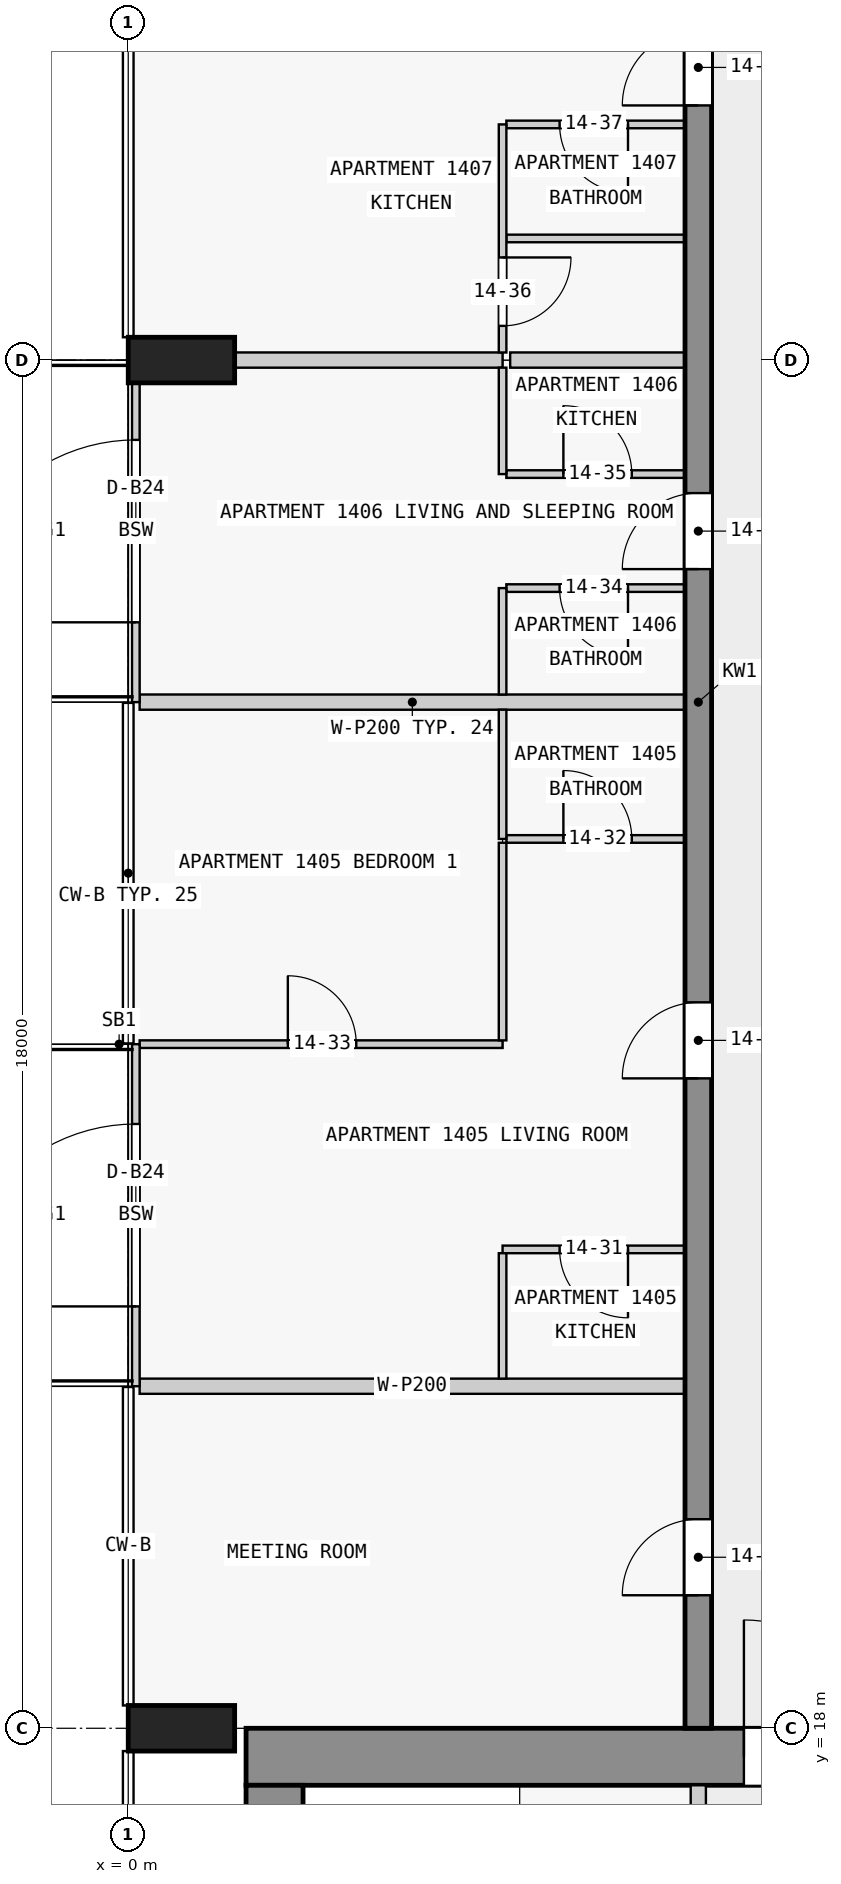
"""IFC4 building model, lengths in metres.
Left out: names, types, materials, properties, quantities, classifications, styles, units other than length and angle.
Written with IfcOpenShell. Run it as: python <this file> out.ifc"""

import sys

from ifc_helpers import new_model, si_unit, direction, frame, frame_2d, origin, origin_2d, place, context, subcontext, project, spatial, rectangle, extrude, element, fill, save


model = new_model("IFC4")
c1 = context("Model", 3, precision=1e-05, world=origin(), true_north=direction((0.0, 1.0)))
c2 = subcontext(c1, "Body", "Model", "MODEL_VIEW")
j1 = project(units=[si_unit("LENGTHUNIT", "METRE"), si_unit("PLANEANGLEUNIT", "RADIAN")], contexts=[c1])
p1 = place(None, origin())
s1 = spatial("IfcSite", under=j1, at=p1, CompositionType="ELEMENT")
p2 = place(p1, origin())
s2 = spatial("IfcBuilding", under=s1, at=p2, CompositionType="ELEMENT")
p3 = place(p2, frame((0.0, 0.0, 58.3)))
s3 = spatial("IfcBuildingStorey", under=s2, at=p3, CompositionType="ELEMENT", Elevation=58.3)
for number, where, z_axis, x_axis in (
    (1, (0.7, 36.0, 0.0), (0.0, 0.0, 1.0), (0.0, 1.0, 0.0)),
    (2, (0.7, 18.0, 0.0), (0.0, 0.0, 1.0), (0.0, 1.0, 0.0)),
):
    element("IfcColumn", number, at=place(p3, frame(where, z_axis=z_axis, x_axis=x_axis)), inside=s3, PredefinedType="COLUMN", context=c2, shape_type="SweptSolid", body=[
        extrude(rectangle(XDim=0.6, YDim=1.4, at=origin_2d()), origin(), (0.0, 0.0, 1.0), 3.5),
    ])
p4 = place(p3, frame((1.55, 17.625, 0.0), z_axis=(0.0, 0.0, 1.0), x_axis=(1.0, 0.0, 0.0)))
e3 = element("IfcWall", 3, at=p4, inside=s3, PredefinedType="SHEAR", context=c2, shape_type="SweptSolid", body=[
    extrude(rectangle(XDim=20.95, YDim=0.75, at=frame_2d((10.475, 0.0))), origin(), (0.0, 0.0, 1.0), 3.25),
])
p5 = place(p4, frame((6.55, 0.0, 0.0)))
e4 = element("IfcOpeningElement", 4, at=p5, cuts=e3, PredefinedType="OPENING", context=c2, shape_type="SweptSolid", body=[
    extrude(rectangle(XDim=1.8, YDim=2.1, at=frame_2d((0.9, 1.05))), frame((0.0, 0.385, 0.0), z_axis=(0.0, -1.0, 0.0), x_axis=(1.0, 0.0, 0.0)), (0.0, 0.0, 1.0), 0.77),
])
p6 = place(p3, frame((1.925, 2.5, 0.0), z_axis=(0.0, 0.0, 1.0), x_axis=(0.0, 1.0, 0.0)))
e5 = element("IfcWall", 5, at=p6, inside=s3, PredefinedType="SHEAR", context=c2, shape_type="SweptSolid", body=[
    extrude(rectangle(XDim=14.75, YDim=0.75, at=frame_2d((7.375, 0.0))), origin(), (0.0, 0.0, 1.0), 3.25),
])
p7 = place(p3, frame((7.5, 18.0, 0.0), z_axis=(0.0, 0.0, 1.0), x_axis=(0.0, 1.0, 0.0)))
e6 = element("IfcWall", 6, at=p7, inside=s3, PredefinedType="SHEAR", context=c2, shape_type="SweptSolid", body=[
    extrude(rectangle(XDim=27.0, YDim=0.35, at=frame_2d((13.5, 0.0))), origin(), (0.0, 0.0, 1.0), 3.25),
])
p8 = place(p7, frame((1.75, 0.0, 0.0)))
e7 = element("IfcOpeningElement", 7, at=p8, cuts=e6, PredefinedType="OPENING", context=c2, shape_type="SweptSolid", body=[
    extrude(rectangle(XDim=1.0, YDim=2.1, at=frame_2d((0.5, 1.05))), frame((0.0, 0.185, 0.0), z_axis=(0.0, -1.0, 0.0), x_axis=(1.0, 0.0, 0.0)), (0.0, 0.0, 1.0), 0.37),
])
p9 = place(p7, frame((8.55, 0.0, 0.0)))
e8 = element("IfcOpeningElement", 8, at=p9, cuts=e6, PredefinedType="OPENING", context=c2, shape_type="SweptSolid", body=[
    extrude(rectangle(XDim=1.0, YDim=2.1, at=frame_2d((0.5, 1.05))), frame((0.0, 0.185, 0.0), z_axis=(0.0, -1.0, 0.0), x_axis=(1.0, 0.0, 0.0)), (0.0, 0.0, 1.0), 0.37),
])
p10 = place(p7, frame((15.25, 0.0, 0.0)))
e9 = element("IfcOpeningElement", 9, at=p10, cuts=e6, PredefinedType="OPENING", context=c2, shape_type="SweptSolid", body=[
    extrude(rectangle(XDim=1.0, YDim=2.1, at=frame_2d((0.5, 1.05))), frame((0.0, 0.185, 0.0), z_axis=(0.0, -1.0, 0.0), x_axis=(1.0, 0.0, 0.0)), (0.0, 0.0, 1.0), 0.37),
])
p11 = place(p7, frame((21.35, 0.0, 0.0)))
e10 = element("IfcOpeningElement", 10, at=p11, cuts=e6, PredefinedType="OPENING", context=c2, shape_type="SweptSolid", body=[
    extrude(rectangle(XDim=1.0, YDim=2.1, at=frame_2d((0.5, 1.05))), frame((0.0, 0.185, 0.0), z_axis=(0.0, -1.0, 0.0), x_axis=(1.0, 0.0, 0.0)), (0.0, 0.0, 1.0), 0.37),
])
p12 = place(p3, frame((0.1, 22.5, 0.0), z_axis=(0.0, 0.0, 1.0), x_axis=(0.0, 1.0, 0.0)))
e11 = element("IfcWall", 11, at=p12, inside=s3, PredefinedType="STANDARD", context=c2, shape_type="SweptSolid", body=[
    extrude(rectangle(XDim=4.5, YDim=0.1, at=frame_2d((2.25, 0.0))), origin(), (0.0, 0.0, 1.0), 3.25),
])
p13 = place(p12, frame((1.05, 0.0, 0.0)))
e12 = element("IfcOpeningElement", 12, at=p13, cuts=e11, PredefinedType="OPENING", context=c2, shape_type="SweptSolid", body=[
    extrude(rectangle(XDim=2.4, YDim=2.4, at=frame_2d((1.2, 1.2))), frame((0.0, 0.06, 0.0), z_axis=(0.0, -1.0, 0.0), x_axis=(1.0, 0.0, 0.0)), (0.0, 0.0, 1.0), 0.12),
])
p14 = place(p3, frame((0.1, 31.5, 0.0), z_axis=(0.0, 0.0, 1.0), x_axis=(0.0, 1.0, 0.0)))
e13 = element("IfcWall", 13, at=p14, inside=s3, PredefinedType="STANDARD", context=c2, shape_type="SweptSolid", body=[
    extrude(rectangle(XDim=4.5, YDim=0.1, at=frame_2d((2.25, 0.0))), origin(), (0.0, 0.0, 1.0), 3.25),
])
p15 = place(p14, frame((1.05, 0.0, 0.0)))
e14 = element("IfcOpeningElement", 14, at=p15, cuts=e13, PredefinedType="OPENING", context=c2, shape_type="SweptSolid", body=[
    extrude(rectangle(XDim=2.4, YDim=2.4, at=frame_2d((1.2, 1.2))), frame((0.0, 0.06, 0.0), z_axis=(0.0, -1.0, 0.0), x_axis=(1.0, 0.0, 0.0)), (0.0, 0.0, 1.0), 0.12),
])
p16 = place(p3, frame((7.5, 10.1, 0.0), z_axis=(0.0, 0.0, 1.0), x_axis=(0.0, 1.0, 0.0)))
e15 = element("IfcWall", 15, at=p16, inside=s3, PredefinedType="PARTITIONING", context=c2, shape_type="SweptSolid", body=[
    extrude(rectangle(XDim=7.15, YDim=0.2, at=frame_2d((3.575, 0.0))), origin(), (0.0, 0.0, 1.0), 3.25),
])
p17 = place(p16, frame((0.8, 0.0, 0.0)))
e16 = element("IfcOpeningElement", 16, at=p17, cuts=e15, PredefinedType="OPENING", context=c2, shape_type="SweptSolid", body=[
    extrude(rectangle(XDim=0.9, YDim=2.1, at=frame_2d((0.45, 1.05))), frame((0.0, 0.11, 0.0), z_axis=(0.0, -1.0, 0.0), x_axis=(1.0, 0.0, 0.0)), (0.0, 0.0, 1.0), 0.22),
])
p18 = place(p16, frame((3.3, 0.0, 0.0)))
e17 = element("IfcOpeningElement", 17, at=p18, cuts=e15, PredefinedType="OPENING", context=c2, shape_type="SweptSolid", body=[
    extrude(rectangle(XDim=0.9, YDim=2.1, at=frame_2d((0.45, 1.05))), frame((0.0, 0.11, 0.0), z_axis=(0.0, -1.0, 0.0), x_axis=(1.0, 0.0, 0.0)), (0.0, 0.0, 1.0), 0.22),
])
p19 = place(p16, frame((5.25, 0.0, 0.0)))
e18 = element("IfcOpeningElement", 18, at=p19, cuts=e15, PredefinedType="OPENING", context=c2, shape_type="SweptSolid", body=[
    extrude(rectangle(XDim=0.9, YDim=2.1, at=frame_2d((0.45, 1.05))), frame((0.0, 0.11, 0.0), z_axis=(0.0, -1.0, 0.0), x_axis=(1.0, 0.0, 0.0)), (0.0, 0.0, 1.0), 0.22),
])
p20 = place(p3, frame((7.325, 22.5, 0.0), z_axis=(0.0, 0.0, 1.0), x_axis=(-1.0, 0.0, 0.0)))
e19 = element("IfcWall", 19, at=p20, inside=s3, PredefinedType="PARTITIONING", context=c2, shape_type="SweptSolid", body=[
    extrude(rectangle(XDim=7.175, YDim=0.2, at=frame_2d((3.587, 0.0))), origin(), (0.0, 0.0, 1.0), 3.25),
])
p21 = place(p3, frame((7.325, 24.3, 0.0), z_axis=(0.0, 0.0, 1.0), x_axis=(-1.0, 0.0, 0.0)))
e20 = element("IfcWall", 20, at=p21, inside=s3, PredefinedType="PARTITIONING", context=c2, shape_type="SweptSolid", body=[
    extrude(rectangle(XDim=2.4, YDim=0.1, at=frame_2d((1.2, 0.0))), origin(), (0.0, 0.0, 1.0), 3.25),
])
p22 = place(p21, frame((0.75, 0.0, 0.0)))
e21 = element("IfcOpeningElement", 21, at=p22, cuts=e20, PredefinedType="OPENING", context=c2, shape_type="SweptSolid", body=[
    extrude(rectangle(XDim=0.9, YDim=2.1, at=frame_2d((0.45, 1.05))), frame((0.0, 0.06, 0.0), z_axis=(0.0, -1.0, 0.0), x_axis=(1.0, 0.0, 0.0)), (0.0, 0.0, 1.0), 0.12),
])
p23 = place(p3, frame((0.15, 27.0, 0.0), z_axis=(0.0, 0.0, 1.0), x_axis=(1.0, 0.0, 0.0)))
e22 = element("IfcWall", 22, at=p23, inside=s3, PredefinedType="PARTITIONING", context=c2, shape_type="SweptSolid", body=[
    extrude(rectangle(XDim=4.775, YDim=0.1, at=frame_2d((2.388, 0.0))), origin(), (0.0, 0.0, 1.0), 3.25),
])
p24 = place(p23, frame((1.95, 0.0, 0.0)))
e23 = element("IfcOpeningElement", 23, at=p24, cuts=e22, PredefinedType="OPENING", context=c2, shape_type="SweptSolid", body=[
    extrude(rectangle(XDim=0.9, YDim=2.1, at=frame_2d((0.45, 1.05))), frame((0.0, 0.06, 0.0), z_axis=(0.0, -1.0, 0.0), x_axis=(1.0, 0.0, 0.0)), (0.0, 0.0, 1.0), 0.12),
])
p25 = place(p3, frame((4.975, 29.7, 0.0), z_axis=(0.0, 0.0, 1.0), x_axis=(1.0, 0.0, 0.0)))
e24 = element("IfcWall", 24, at=p25, inside=s3, PredefinedType="PARTITIONING", context=c2, shape_type="SweptSolid", body=[
    extrude(rectangle(XDim=2.35, YDim=0.1, at=frame_2d((1.175, 0.0))), origin(), (0.0, 0.0, 1.0), 3.25),
])
p26 = place(p25, frame((0.75, 0.0, 0.0)))
e25 = element("IfcOpeningElement", 25, at=p26, cuts=e24, PredefinedType="OPENING", context=c2, shape_type="SweptSolid", body=[
    extrude(rectangle(XDim=0.9, YDim=2.1, at=frame_2d((0.45, 1.05))), frame((0.0, 0.06, 0.0), z_axis=(0.0, -1.0, 0.0), x_axis=(1.0, 0.0, 0.0)), (0.0, 0.0, 1.0), 0.12),
])
p27 = place(p3, frame((7.325, 31.5, 0.0), z_axis=(0.0, 0.0, 1.0), x_axis=(-1.0, 0.0, 0.0)))
e26 = element("IfcWall", 26, at=p27, inside=s3, PredefinedType="PARTITIONING", context=c2, shape_type="SweptSolid", body=[
    extrude(rectangle(XDim=7.175, YDim=0.2, at=frame_2d((3.587, 0.0))), origin(), (0.0, 0.0, 1.0), 3.25),
])
p28 = place(p3, frame((7.325, 33.0, 0.0), z_axis=(0.0, 0.0, 1.0), x_axis=(-1.0, 0.0, 0.0)))
e27 = element("IfcWall", 27, at=p28, inside=s3, PredefinedType="PARTITIONING", context=c2, shape_type="SweptSolid", body=[
    extrude(rectangle(XDim=2.35, YDim=0.1, at=frame_2d((1.175, 0.0))), origin(), (0.0, 0.0, 1.0), 3.25),
])
p29 = place(p28, frame((0.75, 0.0, 0.0)))
e28 = element("IfcOpeningElement", 28, at=p29, cuts=e27, PredefinedType="OPENING", context=c2, shape_type="SweptSolid", body=[
    extrude(rectangle(XDim=0.9, YDim=2.1, at=frame_2d((0.45, 1.05))), frame((0.0, 0.06, 0.0), z_axis=(0.0, -1.0, 0.0), x_axis=(1.0, 0.0, 0.0)), (0.0, 0.0, 1.0), 0.12),
])
p30 = place(p3, frame((4.975, 34.5, 0.0), z_axis=(0.0, 0.0, 1.0), x_axis=(1.0, 0.0, 0.0)))
e29 = element("IfcWall", 29, at=p30, inside=s3, PredefinedType="PARTITIONING", context=c2, shape_type="SweptSolid", body=[
    extrude(rectangle(XDim=2.35, YDim=0.1, at=frame_2d((1.175, 0.0))), origin(), (0.0, 0.0, 1.0), 3.25),
])
p31 = place(p30, frame((0.75, 0.0, 0.0)))
e30 = element("IfcOpeningElement", 30, at=p31, cuts=e29, PredefinedType="OPENING", context=c2, shape_type="SweptSolid", body=[
    extrude(rectangle(XDim=0.9, YDim=2.1, at=frame_2d((0.45, 1.05))), frame((0.0, 0.06, 0.0), z_axis=(0.0, -1.0, 0.0), x_axis=(1.0, 0.0, 0.0)), (0.0, 0.0, 1.0), 0.12),
])
p32 = place(p3, frame((7.325, 36.0, 0.0), z_axis=(0.0, 0.0, 1.0), x_axis=(-1.0, 0.0, 0.0)))
e31 = element("IfcWall", 31, at=p32, inside=s3, PredefinedType="PARTITIONING", context=c2, shape_type="SweptSolid", body=[
    extrude(rectangle(XDim=2.3, YDim=0.2, at=frame_2d((1.15, 0.0))), origin(), (0.0, 0.0, 1.0), 3.25),
])
p33 = place(p3, frame((1.4, 36.0, 0.0), z_axis=(0.0, 0.0, 1.0), x_axis=(1.0, 0.0, 0.0)))
e32 = element("IfcWall", 32, at=p33, inside=s3, PredefinedType="PARTITIONING", context=c2, shape_type="SweptSolid", body=[
    extrude(rectangle(XDim=3.525, YDim=0.2, at=frame_2d((1.763, 0.0))), origin(), (0.0, 0.0, 1.0), 3.25),
])
p34 = place(p3, frame((7.325, 37.6, 0.0), z_axis=(0.0, 0.0, 1.0), x_axis=(-1.0, 0.0, 0.0)))
e33 = element("IfcWall", 33, at=p34, inside=s3, PredefinedType="PARTITIONING", context=c2, shape_type="SweptSolid", body=[
    extrude(rectangle(XDim=2.35, YDim=0.1, at=frame_2d((1.175, 0.0))), origin(), (0.0, 0.0, 1.0), 3.25),
])
p35 = place(p3, frame((7.325, 39.1, 0.0), z_axis=(0.0, 0.0, 1.0), x_axis=(-1.0, 0.0, 0.0)))
e34 = element("IfcWall", 34, at=p35, inside=s3, PredefinedType="PARTITIONING", context=c2, shape_type="SweptSolid", body=[
    extrude(rectangle(XDim=2.35, YDim=0.1, at=frame_2d((1.175, 0.0))), origin(), (0.0, 0.0, 1.0), 3.25),
])
p36 = place(p35, frame((0.75, 0.0, 0.0)))
e35 = element("IfcOpeningElement", 35, at=p36, cuts=e34, PredefinedType="OPENING", context=c2, shape_type="SweptSolid", body=[
    extrude(rectangle(XDim=0.9, YDim=2.1, at=frame_2d((0.45, 1.05))), frame((0.0, 0.06, 0.0), z_axis=(0.0, -1.0, 0.0), x_axis=(1.0, 0.0, 0.0)), (0.0, 0.0, 1.0), 0.12),
])
p37 = place(p3, frame((4.925, 24.25, 0.0), z_axis=(0.0, 0.0, 1.0), x_axis=(0.0, -1.0, 0.0)))
e36 = element("IfcWall", 36, at=p37, inside=s3, PredefinedType="PARTITIONING", context=c2, shape_type="SweptSolid", body=[
    extrude(rectangle(XDim=1.65, YDim=0.1, at=frame_2d((0.825, 0.0))), origin(), (0.0, 0.0, 1.0), 3.25),
])
p38 = place(p3, frame((4.925, 31.4, 0.0), z_axis=(0.0, 0.0, 1.0), x_axis=(0.0, -1.0, 0.0)))
e37 = element("IfcWall", 37, at=p38, inside=s3, PredefinedType="PARTITIONING", context=c2, shape_type="SweptSolid", body=[
    extrude(rectangle(XDim=1.7, YDim=0.1, at=frame_2d((0.85, 0.0))), origin(), (0.0, 0.0, 1.0), 3.25),
])
for number, where, z_axis, x_axis in (
    (38, (4.925, 33.0, 0.0), (0.0, 0.0, 1.0), (0.0, -1.0, 0.0)),
    (39, (4.925, 35.9, 0.0), (0.0, 0.0, 1.0), (0.0, -1.0, 0.0)),
):
    element("IfcWall", number, at=place(p3, frame(where, z_axis=z_axis, x_axis=x_axis)), inside=s3, PredefinedType="PARTITIONING", context=c2, shape_type="SweptSolid", body=[
        extrude(rectangle(XDim=1.4, YDim=0.1, at=frame_2d((0.7, 0.0))), origin(), (0.0, 0.0, 1.0), 3.25),
    ])
p39 = place(p3, frame((4.925, 39.1, 0.0), z_axis=(0.0, 0.0, 1.0), x_axis=(0.0, -1.0, 0.0)))
e40 = element("IfcWall", 40, at=p39, inside=s3, PredefinedType="PARTITIONING", context=c2, shape_type="SweptSolid", body=[
    extrude(rectangle(XDim=3.0, YDim=0.1, at=frame_2d((1.5, 0.0))), origin(), (0.0, 0.0, 1.0), 3.25),
])
p40 = place(p39, frame((1.75, 0.0, 0.0)))
e41 = element("IfcOpeningElement", 41, at=p40, cuts=e40, PredefinedType="OPENING", context=c2, shape_type="SweptSolid", body=[
    extrude(rectangle(XDim=0.9, YDim=2.1, at=frame_2d((0.45, 1.05))), frame((0.0, 0.06, 0.0), z_axis=(0.0, -1.0, 0.0), x_axis=(1.0, 0.0, 0.0)), (0.0, 0.0, 1.0), 0.12),
])
p41 = place(p3, frame((4.925, 27.05, 0.0), z_axis=(0.0, 0.0, 1.0), x_axis=(0.0, 1.0, 0.0)))
e42 = element("IfcWall", 42, at=p41, inside=s3, PredefinedType="PARTITIONING", context=c2, shape_type="SweptSolid", body=[
    extrude(rectangle(XDim=2.6, YDim=0.1, at=frame_2d((1.3, 0.0))), origin(), (0.0, 0.0, 1.0), 3.25),
])
p42 = place(p13, origin())
e43 = element("IfcDoor", 43, at=p42, inside=s3, OperationType="SINGLE_SWING_LEFT", PredefinedType="DOOR", context=c2, shape_type="SweptSolid", body=[
    extrude(rectangle(XDim=2.4, YDim=2.4, at=frame_2d((1.2, 1.2))), frame((0.0, 0.025, 0.0), z_axis=(0.0, -1.0, 0.0), x_axis=(1.0, 0.0, 0.0)), (0.0, 0.0, 1.0), 0.05),
])
fill(e12, e43)
p43 = place(p15, origin())
e44 = element("IfcDoor", 44, at=p43, inside=s3, OperationType="SINGLE_SWING_LEFT", PredefinedType="DOOR", context=c2, shape_type="SweptSolid", body=[
    extrude(rectangle(XDim=2.4, YDim=2.4, at=frame_2d((1.2, 1.2))), frame((0.0, 0.025, 0.0), z_axis=(0.0, -1.0, 0.0), x_axis=(1.0, 0.0, 0.0)), (0.0, 0.0, 1.0), 0.05),
])
fill(e14, e44)
p44 = place(p5, origin())
e45 = element("IfcDoor", 45, at=p44, inside=s3, OperationType="DOUBLE_DOOR_SINGLE_SWING", PredefinedType="DOOR", context=c2, shape_type="SweptSolid", body=[
    extrude(rectangle(XDim=1.8, YDim=2.1, at=frame_2d((0.9, 1.05))), frame((0.0, 0.025, 0.0), z_axis=(0.0, -1.0, 0.0), x_axis=(1.0, 0.0, 0.0)), (0.0, 0.0, 1.0), 0.05),
])
fill(e4, e45)
p45 = place(p8, origin())
e46 = element("IfcDoor", 46, at=p45, inside=s3, OperationType="SINGLE_SWING_LEFT", PredefinedType="DOOR", context=c2, shape_type="SweptSolid", body=[
    extrude(rectangle(XDim=1.0, YDim=2.1, at=frame_2d((0.5, 1.05))), frame((0.0, 0.025, 0.0), z_axis=(0.0, -1.0, 0.0), x_axis=(1.0, 0.0, 0.0)), (0.0, 0.0, 1.0), 0.05),
])
fill(e7, e46)
p46 = place(p9, origin())
e47 = element("IfcDoor", 47, at=p46, inside=s3, OperationType="SINGLE_SWING_LEFT", PredefinedType="DOOR", context=c2, shape_type="SweptSolid", body=[
    extrude(rectangle(XDim=1.0, YDim=2.1, at=frame_2d((0.5, 1.05))), frame((0.0, 0.025, 0.0), z_axis=(0.0, -1.0, 0.0), x_axis=(1.0, 0.0, 0.0)), (0.0, 0.0, 1.0), 0.05),
])
fill(e8, e47)
p47 = place(p10, origin())
e48 = element("IfcDoor", 48, at=p47, inside=s3, OperationType="SINGLE_SWING_RIGHT", PredefinedType="DOOR", context=c2, shape_type="SweptSolid", body=[
    extrude(rectangle(XDim=1.0, YDim=2.1, at=frame_2d((0.5, 1.05))), frame((0.0, 0.025, 0.0), z_axis=(0.0, -1.0, 0.0), x_axis=(1.0, 0.0, 0.0)), (0.0, 0.0, 1.0), 0.05),
])
fill(e9, e48)
p48 = place(p11, origin())
e49 = element("IfcDoor", 49, at=p48, inside=s3, OperationType="SINGLE_SWING_RIGHT", PredefinedType="DOOR", context=c2, shape_type="SweptSolid", body=[
    extrude(rectangle(XDim=1.0, YDim=2.1, at=frame_2d((0.5, 1.05))), frame((0.0, 0.025, 0.0), z_axis=(0.0, -1.0, 0.0), x_axis=(1.0, 0.0, 0.0)), (0.0, 0.0, 1.0), 0.05),
])
fill(e10, e49)
p49 = place(p22, origin())
e50 = element("IfcDoor", 50, at=p49, inside=s3, OperationType="SINGLE_SWING_LEFT", PredefinedType="DOOR", context=c2, shape_type="SweptSolid", body=[
    extrude(rectangle(XDim=0.9, YDim=2.1, at=frame_2d((0.45, 1.05))), frame((0.0, 0.025, 0.0), z_axis=(0.0, -1.0, 0.0), x_axis=(1.0, 0.0, 0.0)), (0.0, 0.0, 1.0), 0.05),
])
fill(e21, e50)
p50 = place(p26, origin())
e51 = element("IfcDoor", 51, at=p50, inside=s3, OperationType="SINGLE_SWING_RIGHT", PredefinedType="DOOR", context=c2, shape_type="SweptSolid", body=[
    extrude(rectangle(XDim=0.9, YDim=2.1, at=frame_2d((0.45, 1.05))), frame((0.0, 0.025, 0.0), z_axis=(0.0, -1.0, 0.0), x_axis=(1.0, 0.0, 0.0)), (0.0, 0.0, 1.0), 0.05),
])
fill(e25, e51)
p51 = place(p24, origin())
e52 = element("IfcDoor", 52, at=p51, inside=s3, OperationType="SINGLE_SWING_RIGHT", PredefinedType="DOOR", context=c2, shape_type="SweptSolid", body=[
    extrude(rectangle(XDim=0.9, YDim=2.1, at=frame_2d((0.45, 1.05))), frame((0.0, 0.025, 0.0), z_axis=(0.0, -1.0, 0.0), x_axis=(1.0, 0.0, 0.0)), (0.0, 0.0, 1.0), 0.05),
])
fill(e23, e52)
p52 = place(p29, origin())
e53 = element("IfcDoor", 53, at=p52, inside=s3, OperationType="SINGLE_SWING_RIGHT", PredefinedType="DOOR", context=c2, shape_type="SweptSolid", body=[
    extrude(rectangle(XDim=0.9, YDim=2.1, at=frame_2d((0.45, 1.05))), frame((0.0, 0.025, 0.0), z_axis=(0.0, -1.0, 0.0), x_axis=(1.0, 0.0, 0.0)), (0.0, 0.0, 1.0), 0.05),
])
fill(e28, e53)
p53 = place(p31, origin())
e54 = element("IfcDoor", 54, at=p53, inside=s3, OperationType="SINGLE_SWING_RIGHT", PredefinedType="DOOR", context=c2, shape_type="SweptSolid", body=[
    extrude(rectangle(XDim=0.9, YDim=2.1, at=frame_2d((0.45, 1.05))), frame((0.0, 0.025, 0.0), z_axis=(0.0, -1.0, 0.0), x_axis=(1.0, 0.0, 0.0)), (0.0, 0.0, 1.0), 0.05),
])
fill(e30, e54)
p54 = place(p40, origin())
e55 = element("IfcDoor", 55, at=p54, inside=s3, OperationType="SINGLE_SWING_RIGHT", PredefinedType="DOOR", context=c2, shape_type="SweptSolid", body=[
    extrude(rectangle(XDim=0.9, YDim=2.1, at=frame_2d((0.45, 1.05))), frame((0.0, 0.025, 0.0), z_axis=(0.0, -1.0, 0.0), x_axis=(1.0, 0.0, 0.0)), (0.0, 0.0, 1.0), 0.05),
])
fill(e41, e55)
p55 = place(p36, origin())
e56 = element("IfcDoor", 56, at=p55, inside=s3, OperationType="SINGLE_SWING_RIGHT", PredefinedType="DOOR", context=c2, shape_type="SweptSolid", body=[
    extrude(rectangle(XDim=0.9, YDim=2.1, at=frame_2d((0.45, 1.05))), frame((0.0, 0.025, 0.0), z_axis=(0.0, -1.0, 0.0), x_axis=(1.0, 0.0, 0.0)), (0.0, 0.0, 1.0), 0.05),
])
fill(e35, e56)
save(model, sys.argv[1])
